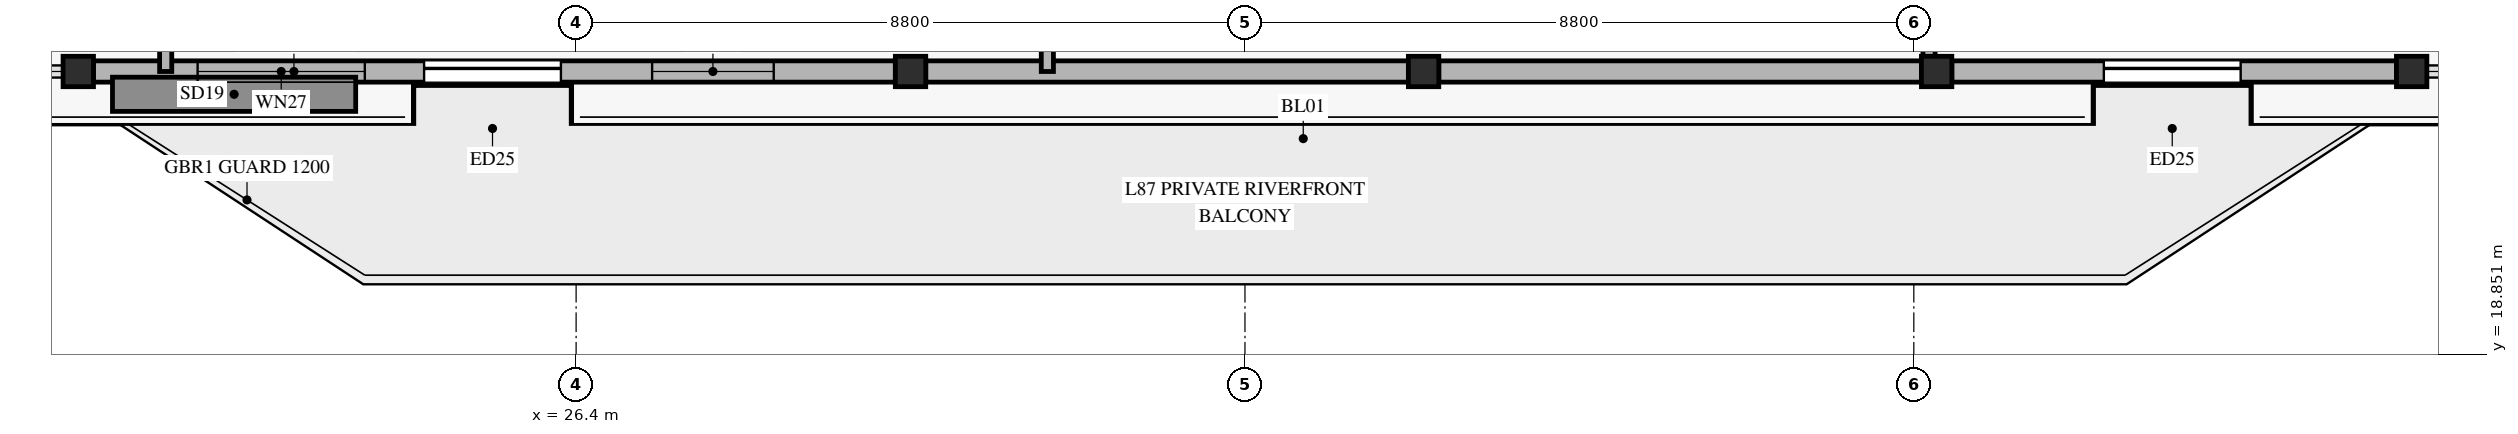
"""IFC4 building model, lengths in metres.
Left out: names, types, materials, properties, quantities, classifications, styles, units other than length and angle.
Written with IfcOpenShell. Run it as: python <this file> out.ifc"""

import sys

from ifc_helpers import new_model, si_unit, direction, frame, frame_2d, origin, origin_2d, place, context, subcontext, project, spatial, rectangle, hollow_rectangle, extrude, source, transform, mapped, element, fill, save


model = new_model("IFC4")
c1 = context("Model", 3, precision=1e-05, world=origin(), true_north=direction((0.0, 1.0)))
c2 = subcontext(c1, "Body", "Model", "MODEL_VIEW")
j1 = project(units=[si_unit("LENGTHUNIT", "METRE"), si_unit("PLANEANGLEUNIT", "RADIAN")], contexts=[c1])
p1 = place(None, origin())
s1 = spatial("IfcSite", under=j1, at=p1, CompositionType="ELEMENT")
p2 = place(p1, origin())
s2 = spatial("IfcBuilding", under=s1, at=p2, CompositionType="ELEMENT")
p3 = place(p2, frame((0.0, 0.0, 335.7)))
s3 = spatial("IfcBuildingStorey", under=s2, at=p3, CompositionType="ELEMENT", Elevation=335.7)
m1 = source(origin(), c2, "Body", "SweptSolid", [
    extrude(hollow_rectangle(XDim=0.4, YDim=0.4, WallThickness=0.02, at=origin_2d()), origin(), (0.0, 0.0, 1.0), 3.185),
])
for number, where, z_axis, x_axis in (
    (1, (19.85, 22.568, 0.0), (0.0, 0.0, 1.0), (1.0, 0.0, 0.0)),
    (2, (30.8, 22.568, 0.0), (0.0, 0.0, 1.0), (1.0, 0.0, 0.0)),
    (3, (37.55, 22.568, 0.0), (0.0, 0.0, 1.0), (1.0, 0.0, 0.0)),
    (4, (44.3, 22.568, 0.0), (0.0, 0.0, 1.0), (1.0, 0.0, 0.0)),
    (5, (50.55, 22.568, 0.0), (0.0, 0.0, 1.0), (1.0, 0.0, 0.0)),
):
    element("IfcColumn", number, at=place(p3, frame(where, z_axis=z_axis, x_axis=x_axis)), inside=s3, PredefinedType="COLUMN", context=c2, shape_type="MappedRepresentation", body=[
        mapped(m1, transform((0.0, 0.0, 0.0), x_axis=(1.0, 0.0, 0.0), y_axis=(0.0, 1.0, 0.0), z_axis=(0.0, 0.0, 1.0), scale=1.0)),
    ])
p4 = place(p3, frame((20.05, 22.568, 0.0), z_axis=(0.0, 0.0, 1.0), x_axis=(1.0, 0.0, 0.0)))
e6 = element("IfcWall", 6, at=p4, inside=s3, PredefinedType="SOLIDWALL", context=c2, shape_type="SweptSolid", body=[
    extrude(rectangle(XDim=10.55, YDim=0.28, at=frame_2d((5.275, 0.0))), origin(), (0.0, 0.0, 1.0), 2.815),
])
p5 = place(p4, frame((4.35, 0.0, 0.0)))
e7 = element("IfcOpeningElement", 7, at=p5, cuts=e6, PredefinedType="OPENING", context=c2, shape_type="SweptSolid", body=[
    extrude(rectangle(XDim=1.8, YDim=2.25, at=frame_2d((0.9, 1.125))), frame((0.0, 0.15, 0.0), z_axis=(0.0, -1.0, 0.0), x_axis=(1.0, 0.0, 0.0)), (0.0, 0.0, 1.0), 0.3),
])
p6 = place(p4, frame((1.37, 0.0, 0.45)))
e8 = element("IfcOpeningElement", 8, at=p6, cuts=e6, PredefinedType="OPENING", context=c2, shape_type="SweptSolid", body=[
    extrude(rectangle(XDim=2.2, YDim=2.1, at=frame_2d((1.1, 1.05))), frame((0.0, 0.15, 0.0), z_axis=(0.0, -1.0, 0.0), x_axis=(1.0, 0.0, 0.0)), (0.0, 0.0, 1.0), 0.3),
])
p7 = place(p4, frame((7.35, 0.0, 0.45)))
e9 = element("IfcOpeningElement", 9, at=p7, cuts=e6, PredefinedType="OPENING", context=c2, shape_type="SweptSolid", body=[
    extrude(rectangle(XDim=1.6, YDim=2.0, at=frame_2d((0.8, 1.0))), frame((0.0, 0.15, 0.0), z_axis=(0.0, -1.0, 0.0), x_axis=(1.0, 0.0, 0.0)), (0.0, 0.0, 1.0), 0.3),
])
for number, where, z_axis, x_axis in (
    (10, (31.0, 22.568, 0.0), (0.0, 0.0, 1.0), (1.0, 0.0, 0.0)),
    (11, (37.75, 22.568, 0.0), (0.0, 0.0, 1.0), (1.0, 0.0, 0.0)),
):
    element("IfcWall", number, at=place(p3, frame(where, z_axis=z_axis, x_axis=x_axis)), inside=s3, PredefinedType="SOLIDWALL", context=c2, shape_type="SweptSolid", body=[
        extrude(rectangle(XDim=6.35, YDim=0.28, at=frame_2d((3.175, 0.0))), origin(), (0.0, 0.0, 1.0), 2.815),
    ])
p8 = place(p3, frame((44.5, 22.568, 0.0), z_axis=(0.0, 0.0, 1.0), x_axis=(1.0, 0.0, 0.0)))
e12 = element("IfcWall", 12, at=p8, inside=s3, PredefinedType="SOLIDWALL", context=c2, shape_type="SweptSolid", body=[
    extrude(rectangle(XDim=5.85, YDim=0.28, at=frame_2d((2.925, 0.0))), origin(), (0.0, 0.0, 1.0), 2.815),
])
p9 = place(p8, frame((2.0, 0.0, 0.0)))
e13 = element("IfcOpeningElement", 13, at=p9, cuts=e12, PredefinedType="OPENING", context=c2, shape_type="SweptSolid", body=[
    extrude(rectangle(XDim=1.8, YDim=2.25, at=frame_2d((0.9, 1.125))), frame((0.0, 0.15, 0.0), z_axis=(0.0, -1.0, 0.0), x_axis=(1.0, 0.0, 0.0)), (0.0, 0.0, 1.0), 0.3),
])
p10 = place(p3, frame((21.0, 22.568, 0.0), z_axis=(0.0, 0.0, 1.0), x_axis=(0.0, 1.0, 0.0)))
e14 = element("IfcWall", 14, at=p10, inside=s3, PredefinedType="PARTITIONING", context=c2, shape_type="SweptSolid", body=[
    extrude(rectangle(XDim=14.882, YDim=0.16, at=frame_2d((7.441, 0.0))), origin(), (0.0, 0.0, 1.0), 2.77),
])
p11 = place(p10, frame((13.002, 0.0, 0.0)))
e15 = element("IfcOpeningElement", 15, at=p11, cuts=e14, PredefinedType="OPENING", context=c2, shape_type="SweptSolid", body=[
    extrude(rectangle(XDim=1.05, YDim=2.15, at=frame_2d((0.525, 1.075))), frame((0.0, 0.09, 0.0), z_axis=(0.0, -1.0, 0.0), x_axis=(1.0, 0.0, 0.0)), (0.0, 0.0, 1.0), 0.18),
])
p12 = place(p3, frame((32.6, 22.568, 0.0), z_axis=(0.0, 0.0, 1.0), x_axis=(0.0, 1.0, 0.0)))
e16 = element("IfcWall", 16, at=p12, inside=s3, PredefinedType="PARTITIONING", context=c2, shape_type="SweptSolid", body=[
    extrude(rectangle(XDim=12.582, YDim=0.16, at=frame_2d((6.291, 0.0))), origin(), (0.0, 0.0, 1.0), 2.77),
])
p13 = place(p3, frame((44.2, 22.568, 0.0), z_axis=(0.0, 0.0, 1.0), x_axis=(0.0, 1.0, 0.0)))
e17 = element("IfcWall", 17, at=p13, inside=s3, PredefinedType="PARTITIONING", context=c2, shape_type="SweptSolid", body=[
    extrude(rectangle(XDim=14.882, YDim=0.16, at=frame_2d((7.441, 0.0))), origin(), (0.0, 0.0, 1.0), 2.47),
])
p14 = place(p13, frame((13.002, 0.0, 0.0)))
e18 = element("IfcOpeningElement", 18, at=p14, cuts=e17, PredefinedType="OPENING", context=c2, shape_type="SweptSolid", body=[
    extrude(rectangle(XDim=1.05, YDim=2.15, at=frame_2d((0.525, 1.075))), frame((0.0, 0.09, 0.0), z_axis=(0.0, -1.0, 0.0), x_axis=(1.0, 0.0, 0.0)), (0.0, 0.0, 1.0), 0.18),
])
m2 = source(origin(), c2, "Body", "SweptSolid", [
    extrude(rectangle(XDim=1.8, YDim=2.25, at=frame_2d((0.9, 1.125))), frame((0.0, 0.025, 0.0), z_axis=(0.0, -1.0, 0.0), x_axis=(1.0, 0.0, 0.0)), (0.0, 0.0, 1.0), 0.05),
])
p15 = place(p5, origin())
e19 = element("IfcDoor", 19, at=p15, inside=s3, OperationType="SLIDING_TO_LEFT", PredefinedType="DOOR", context=c2, shape_type="MappedRepresentation", body=[
    mapped(m2, transform((0.0, 0.0, 0.0), x_axis=(1.0, 0.0, 0.0), y_axis=(0.0, 1.0, 0.0), z_axis=(0.0, 0.0, 1.0), scale=1.0)),
])
fill(e7, e19)
m3 = source(origin(), c2, "Body", "SweptSolid", [
    extrude(rectangle(XDim=2.2, YDim=2.1, at=frame_2d((1.1, 1.05))), frame((0.0, 0.03, 0.0), z_axis=(0.0, -1.0, 0.0), x_axis=(1.0, 0.0, 0.0)), (0.0, 0.0, 1.0), 0.06),
])
p16 = place(p6, origin())
e20 = element("IfcWindow", 20, at=p16, inside=s3, PartitioningType="SINGLE_PANEL", PredefinedType="WINDOW", context=c2, shape_type="MappedRepresentation", body=[
    mapped(m3, transform((0.0, 0.0, 0.0), x_axis=(1.0, 0.0, 0.0), y_axis=(0.0, 1.0, 0.0), z_axis=(0.0, 0.0, 1.0), scale=1.0)),
])
fill(e8, e20)
m4 = source(origin(), c2, "Body", "SweptSolid", [
    extrude(rectangle(XDim=1.6, YDim=2.0, at=frame_2d((0.8, 1.0))), frame((0.0, 0.03, 0.0), z_axis=(0.0, -1.0, 0.0), x_axis=(1.0, 0.0, 0.0)), (0.0, 0.0, 1.0), 0.06),
])
p17 = place(p7, origin())
e21 = element("IfcWindow", 21, at=p17, inside=s3, PartitioningType="SINGLE_PANEL", PredefinedType="WINDOW", context=c2, shape_type="MappedRepresentation", body=[
    mapped(m4, transform((0.0, 0.0, 0.0), x_axis=(1.0, 0.0, 0.0), y_axis=(0.0, 1.0, 0.0), z_axis=(0.0, 0.0, 1.0), scale=1.0)),
])
fill(e9, e21)
p18 = place(p9, origin())
e22 = element("IfcDoor", 22, at=p18, inside=s3, OperationType="SLIDING_TO_LEFT", PredefinedType="DOOR", context=c2, shape_type="MappedRepresentation", body=[
    mapped(m2, transform((0.0, 0.0, 0.0), x_axis=(1.0, 0.0, 0.0), y_axis=(0.0, 1.0, 0.0), z_axis=(0.0, 0.0, 1.0), scale=1.0)),
])
fill(e13, e22)
save(model, sys.argv[1])
